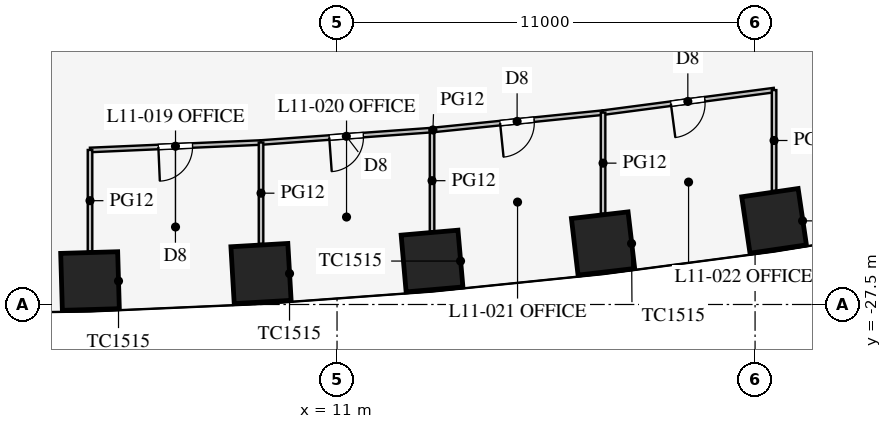
"""IFC4 building model, lengths in metres.
Left out: names, types, materials, properties, quantities, classifications, styles, units other than length and angle.
Written with IfcOpenShell. Run it as: python <this file> out.ifc"""

import sys

from ifc_helpers import new_model, si_unit, direction, frame, frame_2d, origin, origin_2d, place, context, subcontext, project, spatial, rectangle, extrude, element, fill, save


model = new_model("IFC4")
c1 = context("Model", 3, precision=1e-05, world=origin(), true_north=direction((0.0, 1.0)))
c2 = subcontext(c1, "Body", "Model", "MODEL_VIEW")
j1 = project(units=[si_unit("LENGTHUNIT", "METRE"), si_unit("PLANEANGLEUNIT", "RADIAN")], contexts=[c1])
p1 = place(None, origin())
s1 = spatial("IfcSite", under=j1, at=p1, CompositionType="ELEMENT")
p2 = place(p1, origin())
s2 = spatial("IfcBuilding", under=s1, at=p2, CompositionType="ELEMENT")
p3 = place(p2, frame((0.0, 0.0, 50.1)))
s3 = spatial("IfcBuildingStorey", under=s2, at=p3, CompositionType="ELEMENT", Elevation=50.1)
for number, where, z_axis, x_axis in (
    (1, (4.5, -26.883, 0.0), (0.0, 0.0, 1.0), (1.0, 0.029, 0.0)),
    (2, (9.0, -26.686, 0.0), (0.0, 0.0, 1.0), (0.998, 0.058, 0.0)),
    (3, (13.5, -26.357, 0.0), (0.0, 0.0, 1.0), (0.996, 0.087, 0.0)),
    (4, (18.0, -25.895, 0.0), (0.0, 0.0, 1.0), (0.993, 0.116, 0.0)),
    (5, (22.5, -25.299, 0.0), (0.0, 0.0, 1.0), (0.989, 0.145, 0.0)),
):
    element("IfcColumn", number, at=place(p3, frame(where, z_axis=z_axis, x_axis=x_axis)), inside=s3, PredefinedType="COLUMN", context=c2, shape_type="SweptSolid", body=[
        extrude(rectangle(XDim=1.5, YDim=1.5, at=origin_2d()), origin(), (0.0, 0.0, 1.0), 4.2),
    ])
p4 = place(p3, frame((13.5, -22.91, 0.0), z_axis=(0.0, 0.0, 1.0), x_axis=(0.994833141332, 0.101523499286, 0.0)))
e6 = element("IfcWall", 6, at=p4, inside=s3, PredefinedType="PARTITIONING", context=c2, shape_type="SweptSolid", body=[
    extrude(rectangle(XDim=4.523, YDim=0.12, at=frame_2d((2.262, 0.0))), origin(), (0.0, 0.0, 1.0), 2.9),
])
p5 = place(p4, frame((1.8, 0.0, 0.15)))
e7 = element("IfcOpeningElement", 7, at=p5, cuts=e6, PredefinedType="OPENING", context=c2, shape_type="SweptSolid", body=[
    extrude(rectangle(XDim=0.9, YDim=2.1, at=frame_2d((0.45, 1.05))), frame((0.0, 0.07, 0.0), z_axis=(0.0, -1.0, 0.0), x_axis=(1.0, 0.0, 0.0)), (0.0, 0.0, 1.0), 0.14),
])
p6 = place(p3, frame((18.0, -22.451, 0.0), z_axis=(0.0, 0.0, 1.0), x_axis=(0.991435244698, 0.130599217346, 0.0)))
e8 = element("IfcWall", 8, at=p6, inside=s3, PredefinedType="PARTITIONING", context=c2, shape_type="SweptSolid", body=[
    extrude(rectangle(XDim=4.539, YDim=0.12, at=frame_2d((2.27, 0.0))), origin(), (0.0, 0.0, 1.0), 2.9),
])
p7 = place(p6, frame((1.8, 0.0, 0.15)))
e9 = element("IfcOpeningElement", 9, at=p7, cuts=e8, PredefinedType="OPENING", context=c2, shape_type="SweptSolid", body=[
    extrude(rectangle(XDim=0.9, YDim=2.1, at=frame_2d((0.45, 1.05))), frame((0.0, 0.07, 0.0), z_axis=(0.0, -1.0, 0.0), x_axis=(1.0, 0.0, 0.0)), (0.0, 0.0, 1.0), 0.14),
])
p8 = place(p3, frame((4.5, -23.433, 0.0), z_axis=(0.0, 0.0, 1.0), x_axis=(0.999052370647, 0.043524254212, 0.0)))
e10 = element("IfcWall", 10, at=p8, inside=s3, PredefinedType="PARTITIONING", context=c2, shape_type="SweptSolid", body=[
    extrude(rectangle(XDim=4.504, YDim=0.12, at=frame_2d((2.252, 0.0))), origin(), (0.0, 0.0, 1.0), 2.9),
])
p9 = place(p8, frame((1.8, 0.0, 0.15)))
e11 = element("IfcOpeningElement", 11, at=p9, cuts=e10, PredefinedType="OPENING", context=c2, shape_type="SweptSolid", body=[
    extrude(rectangle(XDim=0.9, YDim=2.1, at=frame_2d((0.45, 1.05))), frame((0.0, 0.07, 0.0), z_axis=(0.0, -1.0, 0.0), x_axis=(1.0, 0.0, 0.0)), (0.0, 0.0, 1.0), 0.14),
])
p10 = place(p3, frame((9.0, -23.237, 0.0), z_axis=(0.0, 0.0, 1.0), x_axis=(0.997363894896, 0.072562119306, 0.0)))
e12 = element("IfcWall", 12, at=p10, inside=s3, PredefinedType="PARTITIONING", context=c2, shape_type="SweptSolid", body=[
    extrude(rectangle(XDim=4.512, YDim=0.12, at=frame_2d((2.256, 0.0))), origin(), (0.0, 0.0, 1.0), 2.9),
])
p11 = place(p10, frame((1.8, 0.0, 0.15)))
e13 = element("IfcOpeningElement", 13, at=p11, cuts=e12, PredefinedType="OPENING", context=c2, shape_type="SweptSolid", body=[
    extrude(rectangle(XDim=0.9, YDim=2.1, at=frame_2d((0.45, 1.05))), frame((0.0, 0.07, 0.0), z_axis=(0.0, -1.0, 0.0), x_axis=(1.0, 0.0, 0.0)), (0.0, 0.0, 1.0), 0.14),
])
p12 = place(p3, frame((13.5, -22.91, 0.0), z_axis=(0.0, 0.0, 1.0), x_axis=(0.0, -1.0, 0.0)))
e14 = element("IfcWall", 14, at=p12, inside=s3, PredefinedType="PARTITIONING", context=c2, shape_type="SweptSolid", body=[
    extrude(rectangle(XDim=2.664, YDim=0.12, at=frame_2d((1.332, 0.0))), origin(), (0.0, 0.0, 1.0), 2.9),
])
p13 = place(p3, frame((18.0, -22.451, 0.0), z_axis=(0.0, 0.0, 1.0), x_axis=(0.0, -1.0, 0.0)))
e15 = element("IfcWall", 15, at=p13, inside=s3, PredefinedType="PARTITIONING", context=c2, shape_type="SweptSolid", body=[
    extrude(rectangle(XDim=2.659, YDim=0.12, at=frame_2d((1.33, 0.0))), origin(), (0.0, 0.0, 1.0), 2.9),
])
p14 = place(p3, frame((22.5, -21.858, 0.0), z_axis=(0.0, 0.0, 1.0), x_axis=(0.0, -1.0, 0.0)))
e16 = element("IfcWall", 16, at=p14, inside=s3, PredefinedType="PARTITIONING", context=c2, shape_type="SweptSolid", body=[
    extrude(rectangle(XDim=2.653, YDim=0.12, at=frame_2d((1.327, 0.0))), origin(), (0.0, 0.0, 1.0), 2.9),
])
p15 = place(p3, frame((4.5, -23.433, 0.0), z_axis=(0.0, 0.0, 1.0), x_axis=(0.0, -1.0, 0.0)))
e17 = element("IfcWall", 17, at=p15, inside=s3, PredefinedType="PARTITIONING", context=c2, shape_type="SweptSolid", body=[
    extrude(rectangle(XDim=2.669, YDim=0.12, at=frame_2d((1.335, 0.0))), origin(), (0.0, 0.0, 1.0), 2.9),
])
p16 = place(p3, frame((9.0, -23.237, 0.0), z_axis=(0.0, 0.0, 1.0), x_axis=(0.0, -1.0, 0.0)))
e18 = element("IfcWall", 18, at=p16, inside=s3, PredefinedType="PARTITIONING", context=c2, shape_type="SweptSolid", body=[
    extrude(rectangle(XDim=2.667, YDim=0.12, at=frame_2d((1.334, 0.0))), origin(), (0.0, 0.0, 1.0), 2.9),
])
p17 = place(p9, frame((0.9, 0.0, 0.0), z_axis=(0.0, 0.0, 1.0), x_axis=(-1.0, 0.0, 0.0)))
e19 = element("IfcDoor", 19, at=p17, inside=s3, OperationType="SINGLE_SWING_RIGHT", PredefinedType="DOOR", context=c2, shape_type="SweptSolid", body=[
    extrude(rectangle(XDim=0.9, YDim=2.1, at=frame_2d((0.45, 1.05))), frame((0.0, 0.025, 0.0), z_axis=(0.0, -1.0, 0.0), x_axis=(1.0, 0.0, 0.0)), (0.0, 0.0, 1.0), 0.05),
])
fill(e11, e19)
p18 = place(p11, frame((0.9, 0.0, 0.0), z_axis=(0.0, 0.0, 1.0), x_axis=(-1.0, 0.0, 0.0)))
e20 = element("IfcDoor", 20, at=p18, inside=s3, OperationType="SINGLE_SWING_RIGHT", PredefinedType="DOOR", context=c2, shape_type="SweptSolid", body=[
    extrude(rectangle(XDim=0.9, YDim=2.1, at=frame_2d((0.45, 1.05))), frame((0.0, 0.025, 0.0), z_axis=(0.0, -1.0, 0.0), x_axis=(1.0, 0.0, 0.0)), (0.0, 0.0, 1.0), 0.05),
])
fill(e13, e20)
p19 = place(p5, frame((0.9, 0.0, 0.0), z_axis=(0.0, 0.0, 1.0), x_axis=(-1.0, 0.0, 0.0)))
e21 = element("IfcDoor", 21, at=p19, inside=s3, OperationType="SINGLE_SWING_RIGHT", PredefinedType="DOOR", context=c2, shape_type="SweptSolid", body=[
    extrude(rectangle(XDim=0.9, YDim=2.1, at=frame_2d((0.45, 1.05))), frame((0.0, 0.025, 0.0), z_axis=(0.0, -1.0, 0.0), x_axis=(1.0, 0.0, 0.0)), (0.0, 0.0, 1.0), 0.05),
])
fill(e7, e21)
p20 = place(p7, frame((0.9, 0.0, 0.0), z_axis=(0.0, 0.0, 1.0), x_axis=(-1.0, 0.0, 0.0)))
e22 = element("IfcDoor", 22, at=p20, inside=s3, OperationType="SINGLE_SWING_RIGHT", PredefinedType="DOOR", context=c2, shape_type="SweptSolid", body=[
    extrude(rectangle(XDim=0.9, YDim=2.1, at=frame_2d((0.45, 1.05))), frame((0.0, 0.025, 0.0), z_axis=(0.0, -1.0, 0.0), x_axis=(1.0, 0.0, 0.0)), (0.0, 0.0, 1.0), 0.05),
])
fill(e9, e22)
save(model, sys.argv[1])
